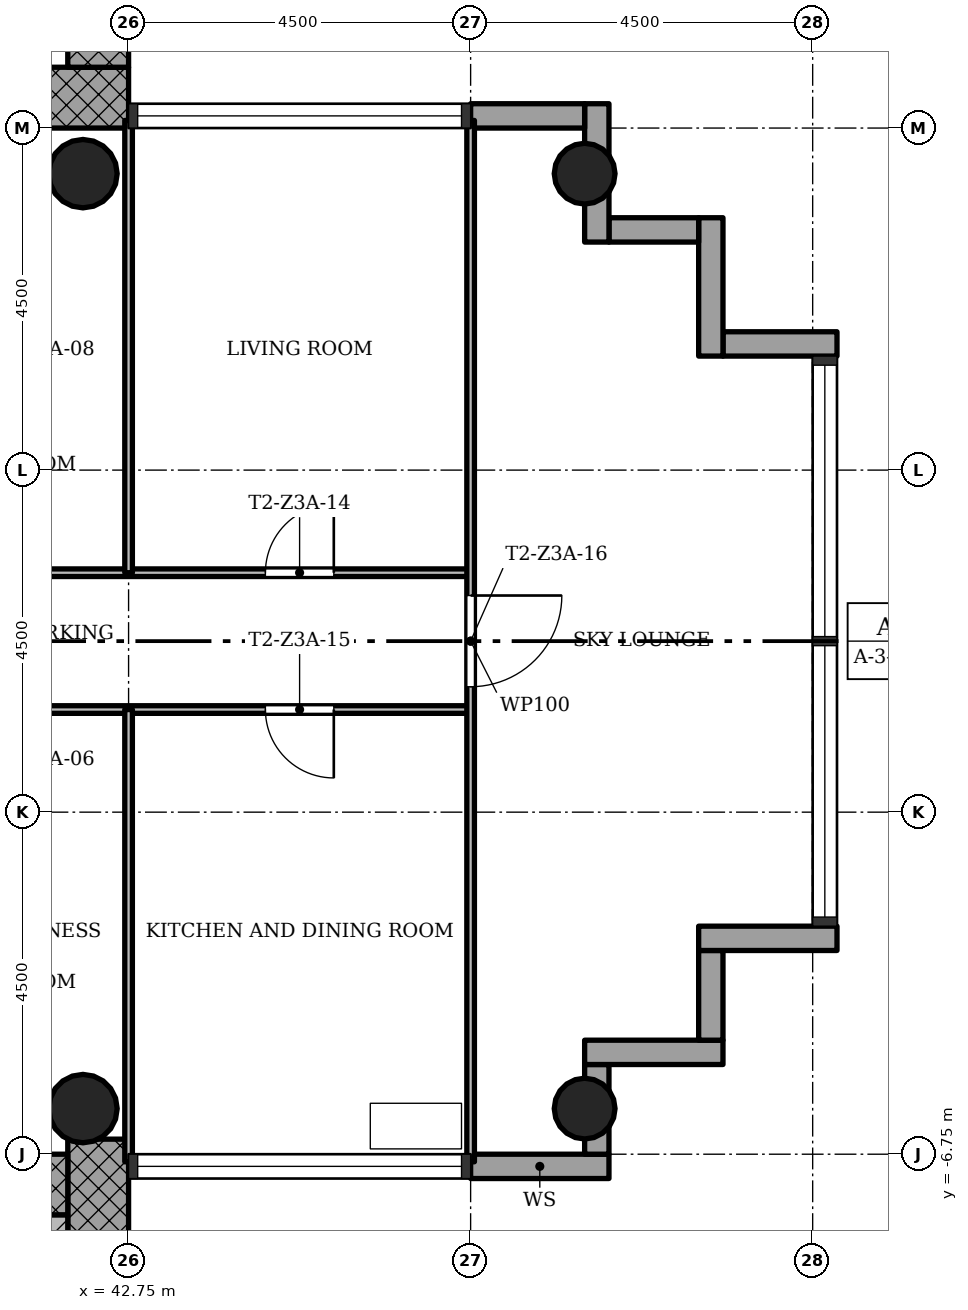
"""IFC4 building model, lengths in metres.
Left out: names, types, materials, properties, quantities, classifications, styles, units other than length and angle.
Written with IfcOpenShell. Run it as: python <this file> out.ifc"""

import sys

from ifc_helpers import new_model, si_unit, direction, frame, frame_2d, origin, origin_2d, place, context, subcontext, project, spatial, rectangle, hollow_circle, extrude, element, fill, save


model = new_model("IFC4")
c1 = context("Model", 3, precision=1e-05, world=origin(), true_north=direction((0.0, 1.0)))
c2 = subcontext(c1, "Body", "Model", "MODEL_VIEW")
j1 = project(units=[si_unit("LENGTHUNIT", "METRE"), si_unit("PLANEANGLEUNIT", "RADIAN")], contexts=[c1])
p1 = place(None, origin())
s1 = spatial("IfcSite", under=j1, at=p1, CompositionType="ELEMENT")
p2 = place(p1, origin())
s2 = spatial("IfcBuilding", under=s1, at=p2, CompositionType="ELEMENT")
p3 = place(p2, frame((0.0, 0.0, 140.5)))
s3 = spatial("IfcBuildingStorey", under=s2, at=p3, CompositionType="ELEMENT", Elevation=140.5)
p4 = place(p3, frame((30.05, 7.15, 0.0), z_axis=(0.0, 0.0, 1.0), x_axis=(1.0, 0.0, 0.0)))
e1 = element("IfcWall", 1, at=p4, inside=s3, PredefinedType="SHEAR", context=c2, shape_type="SweptSolid", body=[
    extrude(rectangle(XDim=12.7, YDim=0.8, at=frame_2d((6.35, 0.0))), origin(), (0.0, 0.0, 1.0), 3.4),
])
p5 = place(p4, frame((5.05, 0.0, 0.0)))
e2 = element("IfcOpeningElement", 2, at=p5, cuts=e1, PredefinedType="OPENING", context=c2, shape_type="SweptSolid", body=[
    extrude(rectangle(XDim=1.8, YDim=2.1, at=frame_2d((0.9, 1.05))), frame((0.0, 0.41, 0.0), z_axis=(0.0, -1.0, 0.0), x_axis=(1.0, 0.0, 0.0)), (0.0, 0.0, 1.0), 0.82),
])
p6 = place(p3, frame((42.35, 7.55, 0.0), z_axis=(0.0, 0.0, 1.0), x_axis=(0.0, 1.0, 0.0)))
e3 = element("IfcWall", 3, at=p6, inside=s3, PredefinedType="SHEAR", context=c2, shape_type="SweptSolid", body=[
    extrude(rectangle(XDim=8.2, YDim=0.8, at=frame_2d((4.1, 0.0))), origin(), (0.0, 0.0, 1.0), 3.4),
])
p7 = place(p3, frame((42.35, -14.95, 0.0), z_axis=(0.0, 0.0, 1.0), x_axis=(0.0, 1.0, 0.0)))
e4 = element("IfcWall", 4, at=p7, inside=s3, PredefinedType="SHEAR", context=c2, shape_type="SweptSolid", body=[
    extrude(rectangle(XDim=8.398, YDim=0.8, at=frame_2d((4.199, 0.0))), origin(), (0.0, 0.0, 1.0), 3.4),
])
p8 = place(p3, frame((41.95, -7.15, 0.0), z_axis=(0.0, 0.0, 1.0), x_axis=(-1.0, 0.0, 0.0)))
e5 = element("IfcWall", 5, at=p8, inside=s3, PredefinedType="SHEAR", context=c2, shape_type="SweptSolid", body=[
    extrude(rectangle(XDim=12.7, YDim=0.8, at=frame_2d((6.35, 0.0))), origin(), (0.0, 0.0, 1.0), 3.4),
])
p9 = place(p8, frame((5.05, 0.0, 0.0)))
e6 = element("IfcOpeningElement", 6, at=p9, cuts=e5, PredefinedType="OPENING", context=c2, shape_type="SweptSolid", body=[
    extrude(rectangle(XDim=1.8, YDim=2.1, at=frame_2d((0.9, 1.05))), frame((0.0, 0.41, 0.0), z_axis=(0.0, -1.0, 0.0), x_axis=(1.0, 0.0, 0.0)), (0.0, 0.0, 1.0), 0.82),
])
for number, where, z_axis, x_axis in (
    (7, (48.75, -6.15, 0.0), (0.0, 0.0, 1.0), (1.0, 0.0, 0.0)),
    (8, (48.75, 6.15, 0.0), (0.0, 0.0, 1.0), (1.0, 0.0, 0.0)),
):
    element("IfcColumn", number, at=place(p3, frame(where, z_axis=z_axis, x_axis=x_axis)), inside=s3, PredefinedType="COLUMN", context=c2, shape_type="SweptSolid", body=[
        extrude(hollow_circle(Radius=0.4, WallThickness=0.028, at=origin_2d()), origin(), (0.0, 0.0, 1.0), 3.4),
    ])
for number, where, z_axis, x_axis in (
    (9, (42.15, -6.15, 0.0), (0.0, 0.0, 1.0), (1.0, 0.0, 0.0)),
    (10, (42.15, 6.15, 0.0), (0.0, 0.0, 1.0), (1.0, 0.0, 0.0)),
):
    element("IfcColumn", number, at=place(p3, frame(where, z_axis=z_axis, x_axis=x_axis)), inside=s3, PredefinedType="COLUMN", context=c2, shape_type="SweptSolid", body=[
        extrude(hollow_circle(Radius=0.45, WallThickness=0.032, at=origin_2d()), origin(), (0.0, 0.0, 1.0), 3.4),
    ])
p10 = place(p3, frame((47.25, -6.91, -0.3), z_axis=(0.0, 0.0, 1.0), x_axis=(1.0, 0.0, 0.0)))
e11 = element("IfcWall", 11, at=p10, inside=s3, PredefinedType="STANDARD", context=c2, shape_type="SweptSolid", body=[
    extrude(rectangle(XDim=1.82, YDim=0.32, at=frame_2d((0.91, 0.0))), origin(), (0.0, 0.0, 1.0), 3.4),
])
p11 = place(p3, frame((48.91, -6.75, -0.3), z_axis=(0.0, 0.0, 1.0), x_axis=(0.0, 1.0, 0.0)))
e12 = element("IfcWall", 12, at=p11, inside=s3, PredefinedType="STANDARD", context=c2, shape_type="SweptSolid", body=[
    extrude(rectangle(XDim=1.18, YDim=0.32, at=frame_2d((0.59, 0.0))), origin(), (0.0, 0.0, 1.0), 3.4),
])
p12 = place(p3, frame((48.75, -5.41, -0.3), z_axis=(0.0, 0.0, 1.0), x_axis=(1.0, 0.0, 0.0)))
e13 = element("IfcWall", 13, at=p12, inside=s3, PredefinedType="STANDARD", context=c2, shape_type="SweptSolid", body=[
    extrude(rectangle(XDim=1.82, YDim=0.32, at=frame_2d((0.91, 0.0))), origin(), (0.0, 0.0, 1.0), 3.4),
])
p13 = place(p3, frame((50.41, -5.25, -0.3), z_axis=(0.0, 0.0, 1.0), x_axis=(0.0, 1.0, 0.0)))
e14 = element("IfcWall", 14, at=p13, inside=s3, PredefinedType="STANDARD", context=c2, shape_type="SweptSolid", body=[
    extrude(rectangle(XDim=1.18, YDim=0.32, at=frame_2d((0.59, 0.0))), origin(), (0.0, 0.0, 1.0), 3.4),
])
p14 = place(p3, frame((50.25, -3.91, -0.3), z_axis=(0.0, 0.0, 1.0), x_axis=(1.0, 0.0, 0.0)))
e15 = element("IfcWall", 15, at=p14, inside=s3, PredefinedType="STANDARD", context=c2, shape_type="SweptSolid", body=[
    extrude(rectangle(XDim=1.82, YDim=0.32, at=frame_2d((0.91, 0.0))), origin(), (0.0, 0.0, 1.0), 3.4),
])
p15 = place(p3, frame((52.07, 3.91, -0.3), z_axis=(0.0, 0.0, 1.0), x_axis=(-1.0, 0.0, 0.0)))
e16 = element("IfcWall", 16, at=p15, inside=s3, PredefinedType="STANDARD", context=c2, shape_type="SweptSolid", body=[
    extrude(rectangle(XDim=1.5, YDim=0.32, at=frame_2d((0.75, 0.0))), origin(), (0.0, 0.0, 1.0), 3.4),
])
p16 = place(p3, frame((50.41, 3.75, -0.3), z_axis=(0.0, 0.0, 1.0), x_axis=(0.0, 1.0, 0.0)))
e17 = element("IfcWall", 17, at=p16, inside=s3, PredefinedType="STANDARD", context=c2, shape_type="SweptSolid", body=[
    extrude(rectangle(XDim=1.82, YDim=0.32, at=frame_2d((0.91, 0.0))), origin(), (0.0, 0.0, 1.0), 3.4),
])
p17 = place(p3, frame((50.25, 5.41, -0.3), z_axis=(0.0, 0.0, 1.0), x_axis=(-1.0, 0.0, 0.0)))
e18 = element("IfcWall", 18, at=p17, inside=s3, PredefinedType="STANDARD", context=c2, shape_type="SweptSolid", body=[
    extrude(rectangle(XDim=1.18, YDim=0.32, at=frame_2d((0.59, 0.0))), origin(), (0.0, 0.0, 1.0), 3.4),
])
p18 = place(p3, frame((48.91, 5.25, -0.3), z_axis=(0.0, 0.0, 1.0), x_axis=(0.0, 1.0, 0.0)))
e19 = element("IfcWall", 19, at=p18, inside=s3, PredefinedType="STANDARD", context=c2, shape_type="SweptSolid", body=[
    extrude(rectangle(XDim=1.82, YDim=0.32, at=frame_2d((0.91, 0.0))), origin(), (0.0, 0.0, 1.0), 3.4),
])
p19 = place(p3, frame((48.75, 6.91, -0.3), z_axis=(0.0, 0.0, 1.0), x_axis=(-1.0, 0.0, 0.0)))
e20 = element("IfcWall", 20, at=p19, inside=s3, PredefinedType="STANDARD", context=c2, shape_type="SweptSolid", body=[
    extrude(rectangle(XDim=1.5, YDim=0.32, at=frame_2d((0.75, 0.0))), origin(), (0.0, 0.0, 1.0), 3.4),
])
p20 = place(p3, frame((47.25, -0.9, 0.0), z_axis=(0.0, 0.0, 1.0), x_axis=(-1.0, 0.0, 0.0)))
e21 = element("IfcWall", 21, at=p20, inside=s3, PredefinedType="PARTITIONING", context=c2, shape_type="SweptSolid", body=[
    extrude(rectangle(XDim=6.75, YDim=0.1, at=frame_2d((3.375, 0.0))), origin(), (0.0, 0.0, 1.0), 3.0),
])
p21 = place(p20, frame((1.8, 0.0, 0.0)))
e22 = element("IfcOpeningElement", 22, at=p21, cuts=e21, PredefinedType="OPENING", context=c2, shape_type="SweptSolid", body=[
    extrude(rectangle(XDim=0.9, YDim=2.1, at=frame_2d((0.45, 1.05))), frame((0.0, 0.06, 0.0), z_axis=(0.0, -1.0, 0.0), x_axis=(1.0, 0.0, 0.0)), (0.0, 0.0, 1.0), 0.12),
])
p22 = place(p3, frame((47.25, 0.9, 0.0), z_axis=(0.0, 0.0, 1.0), x_axis=(-1.0, 0.0, 0.0)))
e23 = element("IfcWall", 23, at=p22, inside=s3, PredefinedType="PARTITIONING", context=c2, shape_type="SweptSolid", body=[
    extrude(rectangle(XDim=6.75, YDim=0.1, at=frame_2d((3.375, 0.0))), origin(), (0.0, 0.0, 1.0), 3.0),
])
p23 = place(p22, frame((1.8, 0.0, 0.0)))
e24 = element("IfcOpeningElement", 24, at=p23, cuts=e23, PredefinedType="OPENING", context=c2, shape_type="SweptSolid", body=[
    extrude(rectangle(XDim=0.9, YDim=2.1, at=frame_2d((0.45, 1.05))), frame((0.0, 0.06, 0.0), z_axis=(0.0, -1.0, 0.0), x_axis=(1.0, 0.0, 0.0)), (0.0, 0.0, 1.0), 0.12),
])
p24 = place(p3, frame((47.25, -6.85, 0.0), z_axis=(0.0, 0.0, 1.0), x_axis=(0.0, 1.0, 0.0)))
e25 = element("IfcWall", 25, at=p24, inside=s3, PredefinedType="PARTITIONING", context=c2, shape_type="SweptSolid", body=[
    extrude(rectangle(XDim=13.7, YDim=0.1, at=frame_2d((6.85, 0.0))), origin(), (0.0, 0.0, 1.0), 3.0),
])
p25 = place(p24, frame((6.25, 0.0, 0.0)))
e26 = element("IfcOpeningElement", 26, at=p25, cuts=e25, PredefinedType="OPENING", context=c2, shape_type="SweptSolid", body=[
    extrude(rectangle(XDim=1.2, YDim=2.1, at=frame_2d((0.6, 1.05))), frame((0.0, 0.06, 0.0), z_axis=(0.0, -1.0, 0.0), x_axis=(1.0, 0.0, 0.0)), (0.0, 0.0, 1.0), 0.12),
])
for number, where, z_axis, x_axis in (
    (27, (42.75, -6.85, 0.0), (0.0, 0.0, 1.0), (0.0, 1.0, 0.0)),
    (28, (42.75, 0.9, 0.0), (0.0, 0.0, 1.0), (0.0, 1.0, 0.0)),
):
    element("IfcWall", number, at=place(p3, frame(where, z_axis=z_axis, x_axis=x_axis)), inside=s3, PredefinedType="PARTITIONING", context=c2, shape_type="SweptSolid", body=[
        extrude(rectangle(XDim=5.95, YDim=0.1, at=frame_2d((2.975, 0.0))), origin(), (0.0, 0.0, 1.0), 3.0),
    ])
p26 = place(p3, frame((37.85, -7.75, 0.0), z_axis=(0.0, 0.0, 1.0), x_axis=(1.0, 0.0, 0.0)))
e29 = element("IfcWall", 29, at=p26, inside=s3, PredefinedType="SHEAR", context=c2, shape_type="SweptSolid", body=[
    extrude(rectangle(XDim=4.1, YDim=0.4, at=frame_2d((2.05, 0.0))), origin(), (0.0, 0.0, 1.0), 3.4),
])
p27 = place(p23, origin())
e30 = element("IfcDoor", 30, at=p27, inside=s3, OperationType="SINGLE_SWING_LEFT", PredefinedType="DOOR", context=c2, shape_type="SweptSolid", body=[
    extrude(rectangle(XDim=0.9, YDim=2.1, at=frame_2d((0.45, 1.05))), frame((0.0, 0.025, 0.0), z_axis=(0.0, -1.0, 0.0), x_axis=(1.0, 0.0, 0.0)), (0.0, 0.0, 1.0), 0.05),
])
fill(e24, e30)
p28 = place(p21, origin())
e31 = element("IfcDoor", 31, at=p28, inside=s3, OperationType="SINGLE_SWING_RIGHT", PredefinedType="DOOR", context=c2, shape_type="SweptSolid", body=[
    extrude(rectangle(XDim=0.9, YDim=2.1, at=frame_2d((0.45, 1.05))), frame((0.0, 0.025, 0.0), z_axis=(0.0, -1.0, 0.0), x_axis=(1.0, 0.0, 0.0)), (0.0, 0.0, 1.0), 0.05),
])
fill(e22, e31)
p29 = place(p25, origin())
e32 = element("IfcDoor", 32, at=p29, inside=s3, OperationType="SINGLE_SWING_RIGHT", PredefinedType="DOOR", context=c2, shape_type="SweptSolid", body=[
    extrude(rectangle(XDim=1.2, YDim=2.1, at=frame_2d((0.6, 1.05))), frame((0.0, 0.025, 0.0), z_axis=(0.0, -1.0, 0.0), x_axis=(1.0, 0.0, 0.0)), (0.0, 0.0, 1.0), 0.05),
])
fill(e26, e32)
save(model, sys.argv[1])
